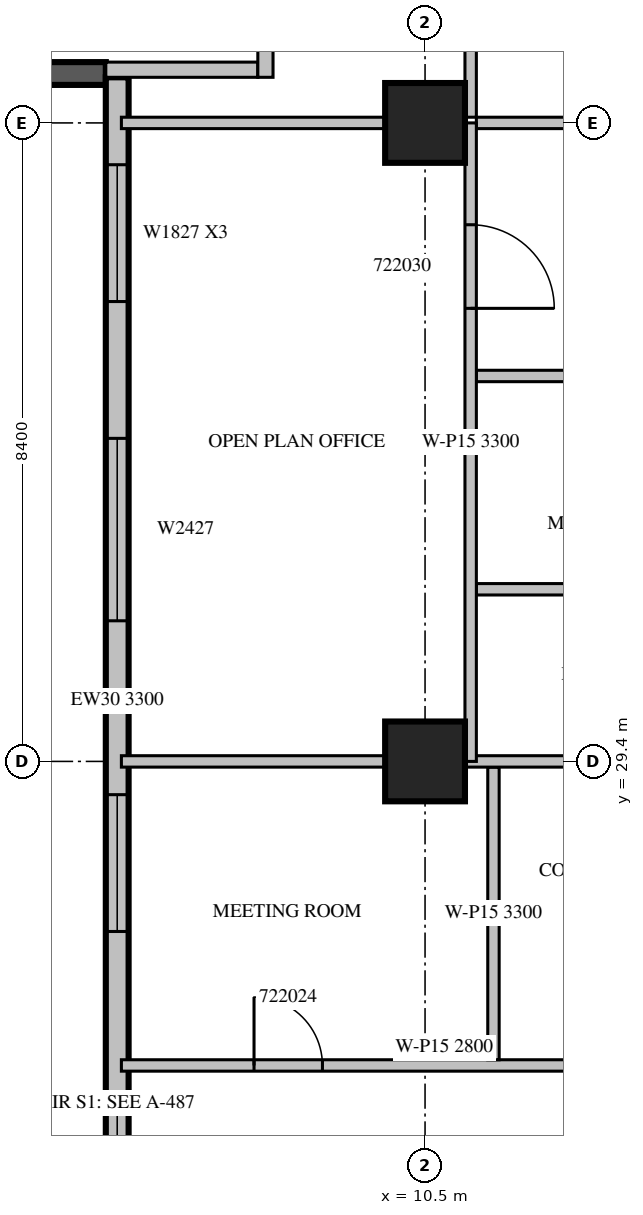
"""IFC4 building model, lengths in metres.
Left out: names, types, materials, properties, quantities, classifications, styles, units other than length and angle.
Written with IfcOpenShell. Run it as: python <this file> out.ifc"""

import sys

from ifc_helpers import new_model, si_unit, direction, frame, frame_2d, origin, origin_2d, place, context, subcontext, project, spatial, rectangle, extrude, source, transform, mapped, element, fill, save


model = new_model("IFC4")
c1 = context("Model", 3, precision=1e-05, world=origin(), true_north=direction((0.0, 1.0)))
c2 = subcontext(c1, "Body", "Model", "MODEL_VIEW")
j1 = project(units=[si_unit("LENGTHUNIT", "METRE"), si_unit("PLANEANGLEUNIT", "RADIAN")], contexts=[c1])
p1 = place(None, origin())
s1 = spatial("IfcSite", under=j1, at=p1, CompositionType="ELEMENT")
p2 = place(p1, origin())
s2 = spatial("IfcBuilding", under=s1, at=p2, CompositionType="ELEMENT")
p3 = place(p2, frame((0.0, 0.0, 103.5)))
s3 = spatial("IfcBuildingStorey", under=s2, at=p3, CompositionType="ELEMENT", Elevation=103.5)
m1 = source(origin(), c2, "Body", "SweptSolid", [
    extrude(rectangle(XDim=1.05, YDim=1.05, at=origin_2d()), origin(), (0.0, 0.0, 1.0), 4.2),
])
for number, where, z_axis, x_axis in (
    (1, (10.5, 29.4, 0.0), (0.0, 0.0, 1.0), (1.0, 0.0, 0.0)),
    (2, (10.5, 37.8, 0.0), (0.0, 0.0, 1.0), (1.0, 0.0, 0.0)),
):
    element("IfcColumn", number, at=place(p3, frame(where, z_axis=z_axis, x_axis=x_axis)), inside=s3, PredefinedType="COLUMN", context=c2, shape_type="MappedRepresentation", body=[
        mapped(m1, transform((0.0, 0.0, 0.0), scale=1.0)),
    ])
m2 = source(origin(), c2, "Body", "SweptSolid", [
    extrude(rectangle(XDim=6.1, YDim=0.3, at=frame_2d((3.05, 0.0))), origin(), (0.0, 0.0, 1.0), 3.8),
])
p4 = place(p3, frame((0.2, 38.45, 0.0), z_axis=(0.0, 0.0, 1.0), x_axis=(1.0, 0.0, 0.0)))
e3 = element("IfcWall", 3, at=p4, inside=s3, PredefinedType="SOLIDWALL", context=c2, shape_type="MappedRepresentation", body=[
    mapped(m2, transform((0.0, 0.0, 0.0), scale=1.0)),
])
p5 = place(p3, frame((6.45, 38.4, 0.0), z_axis=(0.0, 0.0, 1.0), x_axis=(0.0, -1.0, 0.0)))
e4 = element("IfcWall", 4, at=p5, inside=s3, PredefinedType="STANDARD", context=c2, shape_type="SweptSolid", body=[
    extrude(rectangle(XDim=16.4, YDim=0.3, at=frame_2d((8.2, 0.0))), origin(), (0.0, 0.0, 1.0), 3.3),
])
m3 = source(origin(), c2, "Body", "SweptSolid", [
    extrude(rectangle(XDim=1.8, YDim=2.7, at=frame_2d((0.9, 1.35))), frame((0.0, 0.16, 0.0), z_axis=(0.0, -1.0, 0.0), x_axis=(1.0, 0.0, 0.0)), (0.0, 0.0, 1.0), 0.32),
])
p6 = place(p5, frame((1.15, 0.0, 0.6)))
e5 = element("IfcOpeningElement", 5, at=p6, cuts=e4, PredefinedType="OPENING", context=c2, shape_type="MappedRepresentation", body=[
    mapped(m3, transform((0.0, 0.0, 0.0), scale=1.0)),
])
m4 = source(origin(), c2, "Body", "SweptSolid", [
    extrude(rectangle(XDim=2.4, YDim=2.7, at=frame_2d((1.2, 1.35))), frame((0.0, 0.16, 0.0), z_axis=(0.0, -1.0, 0.0), x_axis=(1.0, 0.0, 0.0)), (0.0, 0.0, 1.0), 0.32),
])
p7 = place(p5, frame((4.75, 0.0, 0.6)))
e6 = element("IfcOpeningElement", 6, at=p7, cuts=e4, PredefinedType="OPENING", context=c2, shape_type="MappedRepresentation", body=[
    mapped(m4, transform((0.0, 0.0, 0.0), scale=1.0)),
])
p8 = place(p5, frame((9.438, 0.0, 0.6)))
e7 = element("IfcOpeningElement", 7, at=p8, cuts=e4, PredefinedType="OPENING", context=c2, shape_type="MappedRepresentation", body=[
    mapped(m3, transform((0.0, 0.0, 0.0), scale=1.0)),
])
p9 = place(p5, frame((13.537, 0.0, 0.6)))
e8 = element("IfcOpeningElement", 8, at=p9, cuts=e4, PredefinedType="OPENING", context=c2, shape_type="MappedRepresentation", body=[
    mapped(m3, transform((0.0, 0.0, 0.0), scale=1.0)),
])
m5 = source(origin(), c2, "Body", "SweptSolid", [
    extrude(rectangle(XDim=2.0, YDim=0.2, at=frame_2d((1.0, 0.0))), origin(), (0.0, 0.0, 1.0), 3.8),
])
p10 = place(p3, frame((6.3, 38.5, 0.0), z_axis=(0.0, 0.0, 1.0), x_axis=(1.0, 0.0, 0.0)))
e9 = element("IfcWall", 9, at=p10, inside=s3, PredefinedType="PARTITIONING", context=c2, shape_type="MappedRepresentation", body=[
    mapped(m5, transform((0.0, 0.0, 0.0), scale=1.0)),
])
m6 = source(origin(), c2, "Body", "SweptSolid", [
    extrude(rectangle(XDim=5.45, YDim=0.2, at=frame_2d((2.725, 0.0))), origin(), (0.0, 0.0, 1.0), 3.8),
])
p11 = place(p3, frame((8.4, 38.4, 0.0), z_axis=(0.0, 0.0, 1.0), x_axis=(0.0, 1.0, 0.0)))
e10 = element("IfcWall", 10, at=p11, inside=s3, PredefinedType="PARTITIONING", context=c2, shape_type="MappedRepresentation", body=[
    mapped(m6, transform((0.0, 0.0, 0.0), scale=1.0)),
])
m7 = source(origin(), c2, "Body", "SweptSolid", [
    extrude(rectangle(XDim=1.2, YDim=2.1, at=frame_2d((0.6, 1.05))), frame((0.0, 0.11, 0.0), z_axis=(0.0, -1.0, 0.0), x_axis=(1.0, 0.0, 0.0)), (0.0, 0.0, 1.0), 0.22),
])
p12 = place(p11, frame((0.4, 0.0, 0.0)))
e11 = element("IfcOpeningElement", 11, at=p12, cuts=e10, PredefinedType="OPENING", context=c2, shape_type="MappedRepresentation", body=[
    mapped(m7, transform((0.0, 0.0, 0.0), scale=1.0)),
])
m8 = source(origin(), c2, "Body", "SweptSolid", [
    extrude(rectangle(XDim=0.9, YDim=2.1, at=frame_2d((0.45, 1.05))), frame((0.0, 0.11, 0.0), z_axis=(0.0, -1.0, 0.0), x_axis=(1.0, 0.0, 0.0)), (0.0, 0.0, 1.0), 0.22),
])
p13 = place(p11, frame((3.25, 0.0, 0.0)))
e12 = element("IfcOpeningElement", 12, at=p13, cuts=e10, PredefinedType="OPENING", context=c2, shape_type="MappedRepresentation", body=[
    mapped(m8, transform((0.0, 0.0, 0.0), scale=1.0)),
])
p14 = place(p3, frame((6.505, 25.4, 0.0), z_axis=(0.0, 0.0, 1.0), x_axis=(1.0, 0.0, 0.0)))
e13 = element("IfcWall", 13, at=p14, inside=s3, PredefinedType="PARTITIONING", context=c2, shape_type="SweptSolid", body=[
    extrude(rectangle(XDim=8.495, YDim=0.15, at=frame_2d((4.247, 0.0))), origin(), (0.0, 0.0, 1.0), 2.8),
])
m9 = source(origin(), c2, "Body", "SweptSolid", [
    extrude(rectangle(XDim=0.9, YDim=2.1, at=frame_2d((0.45, 1.05))), frame((0.0, 0.085, 0.0), z_axis=(0.0, -1.0, 0.0), x_axis=(1.0, 0.0, 0.0)), (0.0, 0.0, 1.0), 0.17),
])
p15 = place(p14, frame((1.745, 0.0, 0.0)))
e14 = element("IfcOpeningElement", 14, at=p15, cuts=e13, PredefinedType="OPENING", context=c2, shape_type="MappedRepresentation", body=[
    mapped(m9, transform((0.0, 0.0, 0.0), scale=1.0)),
])
p16 = place(p14, frame((6.82, 0.0, 0.0)))
e15 = element("IfcOpeningElement", 15, at=p16, cuts=e13, PredefinedType="OPENING", context=c2, shape_type="MappedRepresentation", body=[
    mapped(m9, transform((0.0, 0.0, 0.0), scale=1.0)),
])
p17 = place(p3, frame((11.4, 25.475, 0.0), z_axis=(0.0, 0.0, 1.0), x_axis=(0.0, 1.0, 0.0)))
e16 = element("IfcWall", 16, at=p17, inside=s3, PredefinedType="PARTITIONING", context=c2, shape_type="SweptSolid", body=[
    extrude(rectangle(XDim=3.85, YDim=0.15, at=frame_2d((1.925, 0.0))), origin(), (0.0, 0.0, 1.0), 3.3),
])
p18 = place(p3, frame((9.976, 29.4, 0.0), z_axis=(0.0, 0.0, 1.0), x_axis=(-1.0, 0.0, 0.0)))
e17 = element("IfcWall", 17, at=p18, inside=s3, PredefinedType="PARTITIONING", context=c2, shape_type="SweptSolid", body=[
    extrude(rectangle(XDim=3.471, YDim=0.15, at=frame_2d((1.736, 0.0))), origin(), (0.0, 0.0, 1.0), 3.8),
])
m10 = source(origin(), c2, "Body", "SweptSolid", [
    extrude(rectangle(XDim=3.976, YDim=0.15, at=frame_2d((1.988, 0.0))), origin(), (0.0, 0.0, 1.0), 3.8),
])
p19 = place(p3, frame((15.0, 29.4, 0.0), z_axis=(0.0, 0.0, 1.0), x_axis=(-1.0, 0.0, 0.0)))
e18 = element("IfcWall", 18, at=p19, inside=s3, PredefinedType="PARTITIONING", context=c2, shape_type="MappedRepresentation", body=[
    mapped(m10, transform((0.0, 0.0, 0.0), scale=1.0)),
])
m11 = source(origin(), c2, "Body", "SweptSolid", [
    extrude(rectangle(XDim=6.45, YDim=0.15, at=frame_2d((3.225, 0.0))), origin(), (0.0, 0.0, 1.0), 3.8),
])
p20 = place(p3, frame((11.1, 44.325, 0.0), z_axis=(0.0, 0.0, 1.0), x_axis=(0.0, -1.0, 0.0)))
e19 = element("IfcWall", 19, at=p20, inside=s3, PredefinedType="PARTITIONING", context=c2, shape_type="MappedRepresentation", body=[
    mapped(m11, transform((0.0, 0.0, 0.0), scale=1.0)),
])
m12 = source(origin(), c2, "Body", "SweptSolid", [
    extrude(rectangle(XDim=3.825, YDim=0.15, at=frame_2d((1.913, 0.0))), origin(), (0.0, 0.0, 1.0), 3.8),
])
p21 = place(p3, frame((15.0, 31.665, 0.0), z_axis=(0.0, 0.0, 1.0), x_axis=(-1.0, 0.0, 0.0)))
e20 = element("IfcWall", 20, at=p21, inside=s3, PredefinedType="PARTITIONING", context=c2, shape_type="MappedRepresentation", body=[
    mapped(m12, transform((0.0, 0.0, 0.0), scale=1.0)),
])
p22 = place(p3, frame((15.0, 34.471, 0.0), z_axis=(0.0, 0.0, 1.0), x_axis=(-1.0, 0.0, 0.0)))
e21 = element("IfcWall", 21, at=p22, inside=s3, PredefinedType="PARTITIONING", context=c2, shape_type="SweptSolid", body=[
    extrude(rectangle(XDim=3.825, YDim=0.15, at=frame_2d((1.913, 0.0))), origin(), (0.0, 0.0, 1.0), 3.3),
])
m13 = source(origin(), c2, "Body", "SweptSolid", [
    extrude(rectangle(XDim=3.471, YDim=0.15, at=frame_2d((1.736, 0.0))), origin(), (0.0, 0.0, 1.0), 3.8),
])
p23 = place(p3, frame((9.976, 37.8, 0.0), z_axis=(0.0, 0.0, 1.0), x_axis=(-1.0, 0.0, 0.0)))
e22 = element("IfcWall", 22, at=p23, inside=s3, PredefinedType="PARTITIONING", context=c2, shape_type="MappedRepresentation", body=[
    mapped(m13, transform((0.0, 0.0, 0.0), scale=1.0)),
])
p24 = place(p3, frame((15.0, 37.8, 0.0), z_axis=(0.0, 0.0, 1.0), x_axis=(-1.0, 0.0, 0.0)))
e23 = element("IfcWall", 23, at=p24, inside=s3, PredefinedType="PARTITIONING", context=c2, shape_type="MappedRepresentation", body=[
    mapped(m12, transform((0.0, 0.0, 0.0), scale=1.0)),
])
m14 = source(origin(), c2, "Body", "SweptSolid", [
    extrude(rectangle(XDim=8.4, YDim=0.15, at=frame_2d((4.2, 0.0))), origin(), (0.0, 0.0, 1.0), 3.3),
])
p25 = place(p3, frame((11.1, 29.4, 0.0), z_axis=(0.0, 0.0, 1.0), x_axis=(0.0, 1.0, 0.0)))
e24 = element("IfcWall", 24, at=p25, inside=s3, PredefinedType="PARTITIONING", context=c2, shape_type="MappedRepresentation", body=[
    mapped(m14, transform((0.0, 0.0, 0.0), scale=1.0)),
])
m15 = source(origin(), c2, "Body", "SweptSolid", [
    extrude(rectangle(XDim=1.1, YDim=2.1, at=frame_2d((0.55, 1.05))), frame((0.0, 0.085, 0.0), z_axis=(0.0, -1.0, 0.0), x_axis=(1.0, 0.0, 0.0)), (0.0, 0.0, 1.0), 0.17),
])
p26 = place(p25, frame((5.96, 0.0, 0.0)))
e25 = element("IfcOpeningElement", 25, at=p26, cuts=e24, PredefinedType="OPENING", context=c2, shape_type="MappedRepresentation", body=[
    mapped(m15, transform((0.0, 0.0, 0.0), scale=1.0)),
])
m16 = source(origin(), c2, "Body", "SweptSolid", [
    extrude(rectangle(XDim=1.8, YDim=2.7, at=frame_2d((0.9, 1.35))), frame((0.0, 0.03, 0.0), z_axis=(0.0, -1.0, 0.0), x_axis=(1.0, 0.0, 0.0)), (0.0, 0.0, 1.0), 0.06),
])
p27 = place(p6, origin())
e26 = element("IfcWindow", 26, at=p27, inside=s3, PartitioningType="SINGLE_PANEL", PredefinedType="WINDOW", context=c2, shape_type="MappedRepresentation", body=[
    mapped(m16, transform((0.0, 0.0, 0.0), scale=1.0)),
])
fill(e5, e26)
m17 = source(origin(), c2, "Body", "SweptSolid", [
    extrude(rectangle(XDim=2.4, YDim=2.7, at=frame_2d((1.2, 1.35))), frame((0.0, 0.03, 0.0), z_axis=(0.0, -1.0, 0.0), x_axis=(1.0, 0.0, 0.0)), (0.0, 0.0, 1.0), 0.06),
])
p28 = place(p7, origin())
e27 = element("IfcWindow", 27, at=p28, inside=s3, PartitioningType="SINGLE_PANEL", PredefinedType="WINDOW", context=c2, shape_type="MappedRepresentation", body=[
    mapped(m17, transform((0.0, 0.0, 0.0), scale=1.0)),
])
fill(e6, e27)
p29 = place(p8, origin())
e28 = element("IfcWindow", 28, at=p29, inside=s3, PartitioningType="SINGLE_PANEL", PredefinedType="WINDOW", context=c2, shape_type="MappedRepresentation", body=[
    mapped(m16, transform((0.0, 0.0, 0.0), scale=1.0)),
])
fill(e7, e28)
p30 = place(p9, origin())
e29 = element("IfcWindow", 29, at=p30, inside=s3, PartitioningType="SINGLE_PANEL", PredefinedType="WINDOW", context=c2, shape_type="MappedRepresentation", body=[
    mapped(m16, transform((0.0, 0.0, 0.0), scale=1.0)),
])
fill(e8, e29)
m18 = source(origin(), c2, "Body", "SweptSolid", [
    extrude(rectangle(XDim=0.9, YDim=2.1, at=frame_2d((0.45, 1.05))), frame((0.0, 0.025, 0.0), z_axis=(0.0, -1.0, 0.0), x_axis=(1.0, 0.0, 0.0)), (0.0, 0.0, 1.0), 0.05),
])
p31 = place(p15, origin())
e30 = element("IfcDoor", 30, at=p31, inside=s3, OperationType="SINGLE_SWING_LEFT", PredefinedType="DOOR", context=c2, shape_type="MappedRepresentation", body=[
    mapped(m18, transform((0.0, 0.0, 0.0), scale=1.0)),
])
fill(e14, e30)
m19 = source(origin(), c2, "Body", "SweptSolid", [
    extrude(rectangle(XDim=1.1, YDim=2.1, at=frame_2d((0.55, 1.05))), frame((0.0, 0.025, 0.0), z_axis=(0.0, -1.0, 0.0), x_axis=(1.0, 0.0, 0.0)), (0.0, 0.0, 1.0), 0.05),
])
p32 = place(p26, origin())
e31 = element("IfcDoor", 31, at=p32, inside=s3, OperationType="SINGLE_SWING_RIGHT", PredefinedType="DOOR", context=c2, shape_type="MappedRepresentation", body=[
    mapped(m19, transform((0.0, 0.0, 0.0), scale=1.0)),
])
fill(e25, e31)
save(model, sys.argv[1])
